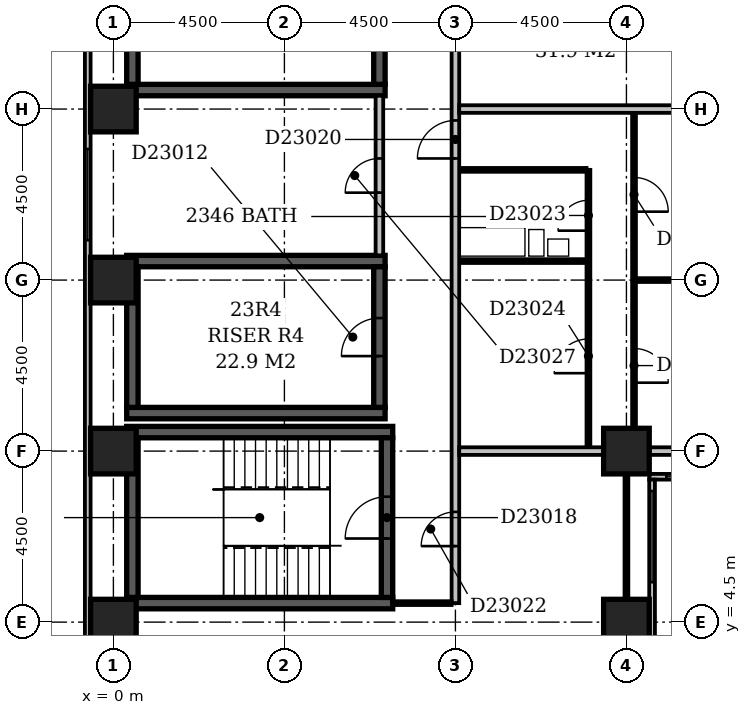
"""IFC4 building model, lengths in metres.
Left out: names, types, materials, properties, quantities, classifications, styles, units other than length and angle.
Written with IfcOpenShell. Run it as: python <this file> out.ifc"""

import sys

from ifc_helpers import new_model, si_unit, direction, frame, frame_2d, origin, origin_2d, place, context, subcontext, project, spatial, rectangle, extrude, element, fill, save


model = new_model("IFC4")
c1 = context("Model", 3, precision=1e-05, world=origin(), true_north=direction((0.0, 1.0)))
c2 = subcontext(c1, "Body", "Model", "MODEL_VIEW")
j1 = project(units=[si_unit("LENGTHUNIT", "METRE"), si_unit("PLANEANGLEUNIT", "RADIAN")], contexts=[c1])
p1 = place(None, origin())
s1 = spatial("IfcSite", under=j1, at=p1, CompositionType="ELEMENT")
p2 = place(p1, origin())
s2 = spatial("IfcBuilding", under=s1, at=p2, CompositionType="ELEMENT")
p3 = place(p2, frame((0.0, 0.0, 93.8)))
s3 = spatial("IfcBuildingStorey", under=s2, at=p3, CompositionType="ELEMENT", Elevation=93.8)
for number, where, z_axis, x_axis in (
    (1, (0.35, 5.0, -0.3), (0.0, 0.0, 1.0), (1.0, 0.0, 0.0)),
    (2, (0.35, 9.5, -0.3), (0.0, 0.0, 1.0), (1.0, 0.0, 0.0)),
):
    element("IfcWall", number, at=place(p3, frame(where, z_axis=z_axis, x_axis=x_axis)), inside=s3, PredefinedType="SHEAR", context=c2, shape_type="SweptSolid", body=[
        extrude(rectangle(XDim=7.0, YDim=0.3, at=frame_2d((3.5, 0.0))), origin(), (0.0, 0.0, 1.0), 3.6),
    ])
for number, where, z_axis, x_axis in (
    (3, (0.35, 10.0, -0.3), (0.0, 0.0, 1.0), (1.0, 0.0, 0.0)),
    (4, (0.35, 14.0, -0.3), (0.0, 0.0, 1.0), (1.0, 0.0, 0.0)),
    (5, (0.35, 18.5, -0.3), (0.0, 0.0, 1.0), (1.0, 0.0, 0.0)),
):
    element("IfcWall", number, at=place(p3, frame(where, z_axis=z_axis, x_axis=x_axis)), inside=s3, PredefinedType="SHEAR", context=c2, shape_type="SweptSolid", body=[
        extrude(rectangle(XDim=6.8, YDim=0.3, at=frame_2d((3.4, 0.0))), origin(), (0.0, 0.0, 1.0), 3.6),
    ])
p4 = place(p3, frame((0.5, 5.15, -0.3), z_axis=(0.0, 0.0, 1.0), x_axis=(0.0, 1.0, 0.0)))
e6 = element("IfcWall", 6, at=p4, inside=s3, PredefinedType="SHEAR", context=c2, shape_type="SweptSolid", body=[
    extrude(rectangle(XDim=4.2, YDim=0.3, at=frame_2d((2.1, 0.0))), origin(), (0.0, 0.0, 1.0), 3.6),
])
for number, where, z_axis, x_axis in (
    (7, (0.5, 10.15, -0.3), (0.0, 0.0, 1.0), (0.0, 1.0, 0.0)),
    (8, (0.5, 18.65, -0.3), (0.0, 0.0, 1.0), (0.0, 1.0, 0.0)),
):
    element("IfcWall", number, at=place(p3, frame(where, z_axis=z_axis, x_axis=x_axis)), inside=s3, PredefinedType="SHEAR", context=c2, shape_type="SweptSolid", body=[
        extrude(rectangle(XDim=3.7, YDim=0.3, at=frame_2d((1.85, 0.0))), origin(), (0.0, 0.0, 1.0), 3.6),
    ])
p5 = place(p3, frame((7.0, 10.15, -0.3), z_axis=(0.0, 0.0, 1.0), x_axis=(0.0, 1.0, 0.0)))
e9 = element("IfcWall", 9, at=p5, inside=s3, PredefinedType="SHEAR", context=c2, shape_type="SweptSolid", body=[
    extrude(rectangle(XDim=3.7, YDim=0.3, at=frame_2d((1.85, 0.0))), origin(), (0.0, 0.0, 1.0), 3.6),
])
p6 = place(p5, frame((1.35, 0.0, 0.3)))
e10 = element("IfcOpeningElement", 10, at=p6, cuts=e9, PredefinedType="OPENING", context=c2, shape_type="SweptSolid", body=[
    extrude(rectangle(XDim=1.0, YDim=2.1, at=frame_2d((0.5, 1.05))), frame((0.0, 0.162, 0.0), z_axis=(0.0, -1.0, 0.0), x_axis=(1.0, 0.0, 0.0)), (0.0, 0.0, 1.0), 0.324),
])
p7 = place(p3, frame((7.0, 18.65, -0.3), z_axis=(0.0, 0.0, 1.0), x_axis=(0.0, 1.0, 0.0)))
e11 = element("IfcWall", 11, at=p7, inside=s3, PredefinedType="SHEAR", context=c2, shape_type="SweptSolid", body=[
    extrude(rectangle(XDim=3.7, YDim=0.3, at=frame_2d((1.85, 0.0))), origin(), (0.0, 0.0, 1.0), 3.6),
])
p8 = place(p7, frame((1.35, 0.0, 0.3)))
e12 = element("IfcOpeningElement", 12, at=p8, cuts=e11, PredefinedType="OPENING", context=c2, shape_type="SweptSolid", body=[
    extrude(rectangle(XDim=1.0, YDim=2.1, at=frame_2d((0.5, 1.05))), frame((0.0, 0.162, 0.0), z_axis=(0.0, -1.0, 0.0), x_axis=(1.0, 0.0, 0.0)), (0.0, 0.0, 1.0), 0.324),
])
p9 = place(p3, frame((7.2, 5.15, -0.3), z_axis=(0.0, 0.0, 1.0), x_axis=(0.0, 1.0, 0.0)))
e13 = element("IfcWall", 13, at=p9, inside=s3, PredefinedType="SHEAR", context=c2, shape_type="SweptSolid", body=[
    extrude(rectangle(XDim=4.2, YDim=0.3, at=frame_2d((2.1, 0.0))), origin(), (0.0, 0.0, 1.0), 3.6),
])
p10 = place(p9, frame((1.55, 0.0, 0.3)))
e14 = element("IfcOpeningElement", 14, at=p10, cuts=e13, PredefinedType="OPENING", context=c2, shape_type="SweptSolid", body=[
    extrude(rectangle(XDim=1.1, YDim=2.1, at=frame_2d((0.55, 1.05))), frame((0.0, 0.162, 0.0), z_axis=(0.0, -1.0, 0.0), x_axis=(1.0, 0.0, 0.0)), (0.0, 0.0, 1.0), 0.324),
])
for number, where, z_axis, x_axis in (
    (15, (0.0, 4.5, -0.3), (0.0, 0.0, 1.0), (1.0, 0.0, 0.0)),
    (16, (13.5, 4.5, -0.3), (0.0, 0.0, 1.0), (1.0, 0.0, 0.0)),
    (17, (0.0, 9.0, -0.3), (0.0, 0.0, 1.0), (1.0, 0.0, 0.0)),
    (18, (13.5, 9.0, -0.3), (0.0, 0.0, 1.0), (1.0, 0.0, 0.0)),
    (19, (0.0, 13.5, -0.3), (0.0, 0.0, 1.0), (1.0, 0.0, 0.0)),
    (20, (0.0, 18.0, -0.3), (0.0, 0.0, 1.0), (1.0, 0.0, 0.0)),
):
    element("IfcColumn", number, at=place(p3, frame(where, z_axis=z_axis, x_axis=x_axis)), inside=s3, PredefinedType="COLUMN", context=c2, shape_type="SweptSolid", body=[
        extrude(rectangle(XDim=1.2, YDim=1.2, at=origin_2d()), origin(), (0.0, 0.0, 1.0), 3.6),
    ])
p11 = place(p3, frame((14.175, 3.9, 0.0), z_axis=(0.0, 0.0, 1.0), x_axis=(0.0, 1.0, 0.0)))
e21 = element("IfcWall", 21, at=p11, inside=s3, PredefinedType="STANDARD", context=c2, shape_type="SweptSolid", body=[
    extrude(rectangle(XDim=4.35, YDim=0.15, at=frame_2d((2.175, 0.0))), origin(), (0.0, 0.0, 1.0), 2.7),
])
p12 = place(p11, frame((1.65, 0.0, 0.6)))
e22 = element("IfcOpeningElement", 22, at=p12, cuts=e21, PredefinedType="OPENING", context=c2, shape_type="SweptSolid", body=[
    extrude(rectangle(XDim=2.4, YDim=1.8, at=frame_2d((1.2, 0.9))), frame((0.0, 0.087, 0.0), z_axis=(0.0, -1.0, 0.0), x_axis=(1.0, 0.0, 0.0)), (0.0, 0.0, 1.0), 0.174),
])
p13 = place(p3, frame((14.1, 8.325, 0.0), z_axis=(0.0, 0.0, 1.0), x_axis=(1.0, 0.0, 0.0)))
e23 = element("IfcWall", 23, at=p13, inside=s3, PredefinedType="STANDARD", context=c2, shape_type="SweptSolid", body=[
    extrude(rectangle(XDim=4.65, YDim=0.15, at=frame_2d((2.325, 0.0))), origin(), (0.0, 0.0, 1.0), 2.7),
])
p14 = place(p13, frame((0.45, 0.0, 0.6)))
e24 = element("IfcOpeningElement", 24, at=p14, cuts=e23, PredefinedType="OPENING", context=c2, shape_type="SweptSolid", body=[
    extrude(rectangle(XDim=2.4, YDim=1.8, at=frame_2d((1.2, 0.9))), frame((0.0, 0.087, 0.0), z_axis=(0.0, -1.0, 0.0), x_axis=(1.0, 0.0, 0.0)), (0.0, 0.0, 1.0), 0.174),
])
p15 = place(p3, frame((-0.675, 59.1, 0.0), z_axis=(0.0, 0.0, 1.0), x_axis=(0.0, -1.0, 0.0)))
e25 = element("IfcWall", 25, at=p15, inside=s3, PredefinedType="STANDARD", context=c2, shape_type="SweptSolid", body=[
    extrude(rectangle(XDim=55.35, YDim=0.15, at=frame_2d((27.675, 0.0))), origin(), (0.0, 0.0, 1.0), 2.7),
])
p16 = place(p15, frame((10.65, 0.0, 0.6)))
e26 = element("IfcOpeningElement", 26, at=p16, cuts=e25, PredefinedType="OPENING", context=c2, shape_type="SweptSolid", body=[
    extrude(rectangle(XDim=2.4, YDim=1.8, at=frame_2d((1.2, 0.9))), frame((0.0, 0.087, 0.0), z_axis=(0.0, -1.0, 0.0), x_axis=(1.0, 0.0, 0.0)), (0.0, 0.0, 1.0), 0.174),
])
p17 = place(p15, frame((15.15, 0.0, 0.6)))
e27 = element("IfcOpeningElement", 27, at=p17, cuts=e25, PredefinedType="OPENING", context=c2, shape_type="SweptSolid", body=[
    extrude(rectangle(XDim=2.4, YDim=1.8, at=frame_2d((1.2, 0.9))), frame((0.0, 0.087, 0.0), z_axis=(0.0, -1.0, 0.0), x_axis=(1.0, 0.0, 0.0)), (0.0, 0.0, 1.0), 0.174),
])
p18 = place(p15, frame((19.65, 0.0, 0.6)))
e28 = element("IfcOpeningElement", 28, at=p18, cuts=e25, PredefinedType="OPENING", context=c2, shape_type="SweptSolid", body=[
    extrude(rectangle(XDim=2.4, YDim=1.8, at=frame_2d((1.2, 0.9))), frame((0.0, 0.087, 0.0), z_axis=(0.0, -1.0, 0.0), x_axis=(1.0, 0.0, 0.0)), (0.0, 0.0, 1.0), 0.174),
])
p19 = place(p15, frame((42.15, 0.0, 0.6)))
e29 = element("IfcOpeningElement", 29, at=p19, cuts=e25, PredefinedType="OPENING", context=c2, shape_type="SweptSolid", body=[
    extrude(rectangle(XDim=2.4, YDim=1.8, at=frame_2d((1.2, 0.9))), frame((0.0, 0.087, 0.0), z_axis=(0.0, -1.0, 0.0), x_axis=(1.0, 0.0, 0.0)), (0.0, 0.0, 1.0), 0.174),
])
p20 = place(p3, frame((0.0, 4.4, 0.0), z_axis=(0.0, 0.0, 1.0), x_axis=(0.0, 1.0, 0.0)))
e30 = element("IfcWall", 30, at=p20, inside=s3, PredefinedType="PARTITIONING", context=c2, shape_type="SweptSolid", body=[
    extrude(rectangle(XDim=0.7, YDim=0.1, at=frame_2d((0.35, 0.0))), origin(), (0.0, 0.0, 1.0), 2.7),
])
p21 = place(p3, frame((7.349, 5.0, 0.0), z_axis=(0.0, 0.0, 1.0), x_axis=(1.0, 0.0, 0.0)))
e31 = element("IfcWall", 31, at=p21, inside=s3, PredefinedType="PARTITIONING", context=c2, shape_type="SweptSolid", body=[
    extrude(rectangle(XDim=1.551, YDim=0.1, at=frame_2d((0.775, 0.0))), origin(), (0.0, 0.0, 1.0), 3.3),
])
p22 = place(p3, frame((9.0, 5.0, 0.0), z_axis=(0.0, 0.0, 1.0), x_axis=(0.0, 1.0, 0.0)))
e32 = element("IfcWall", 32, at=p22, inside=s3, PredefinedType="PARTITIONING", context=c2, shape_type="SweptSolid", body=[
    extrude(rectangle(XDim=44.5, YDim=0.2, at=frame_2d((22.25, 0.0))), origin(), (0.0, 0.0, 1.0), 3.3),
])
p23 = place(p22, frame((18.4, 0.0, 0.0)))
e33 = element("IfcOpeningElement", 33, at=p23, cuts=e32, PredefinedType="OPENING", context=c2, shape_type="SweptSolid", body=[
    extrude(rectangle(XDim=1.0, YDim=2.1, at=frame_2d((0.5, 1.05))), frame((0.0, 0.112, 0.0), z_axis=(0.0, -1.0, 0.0), x_axis=(1.0, 0.0, 0.0)), (0.0, 0.0, 1.0), 0.224),
])
p24 = place(p22, frame((11.7, 0.0, 0.0)))
e34 = element("IfcOpeningElement", 34, at=p24, cuts=e32, PredefinedType="OPENING", context=c2, shape_type="SweptSolid", body=[
    extrude(rectangle(XDim=1.0, YDim=2.1, at=frame_2d((0.5, 1.05))), frame((0.0, 0.112, 0.0), z_axis=(0.0, -1.0, 0.0), x_axis=(1.0, 0.0, 0.0)), (0.0, 0.0, 1.0), 0.224),
])
p25 = place(p22, frame((37.25, 0.0, 0.0)))
e35 = element("IfcOpeningElement", 35, at=p25, cuts=e32, PredefinedType="OPENING", context=c2, shape_type="SweptSolid", body=[
    extrude(rectangle(XDim=0.9, YDim=2.1, at=frame_2d((0.45, 1.05))), frame((0.0, 0.112, 0.0), z_axis=(0.0, -1.0, 0.0), x_axis=(1.0, 0.0, 0.0)), (0.0, 0.0, 1.0), 0.224),
])
p26 = place(p22, frame((1.5, 0.0, 0.0)))
e36 = element("IfcOpeningElement", 36, at=p26, cuts=e32, PredefinedType="OPENING", context=c2, shape_type="SweptSolid", body=[
    extrude(rectangle(XDim=0.9, YDim=2.1, at=frame_2d((0.45, 1.05))), frame((0.0, 0.112, 0.0), z_axis=(0.0, -1.0, 0.0), x_axis=(1.0, 0.0, 0.0)), (0.0, 0.0, 1.0), 0.224),
])
p27 = place(p3, frame((13.5, 5.1, 0.0), z_axis=(0.0, 0.0, 1.0), x_axis=(0.0, 1.0, 0.0)))
e37 = element("IfcWall", 37, at=p27, inside=s3, PredefinedType="PARTITIONING", context=c2, shape_type="SweptSolid", body=[
    extrude(rectangle(XDim=3.3, YDim=0.1, at=frame_2d((1.65, 0.0))), origin(), (0.0, 0.0, 1.0), 2.7),
])
p28 = place(p3, frame((9.1, 9.0, 0.0), z_axis=(0.0, 0.0, 1.0), x_axis=(1.0, 0.0, 0.0)))
e38 = element("IfcWall", 38, at=p28, inside=s3, PredefinedType="PARTITIONING", context=c2, shape_type="SweptSolid", body=[
    extrude(rectangle(XDim=3.8, YDim=0.2, at=frame_2d((1.9, 0.0))), origin(), (0.0, 0.0, 1.0), 3.3),
])
p29 = place(p3, frame((14.1, 9.0, 0.0), z_axis=(0.0, 0.0, 1.0), x_axis=(1.0, 0.0, 0.0)))
e39 = element("IfcWall", 39, at=p29, inside=s3, PredefinedType="PARTITIONING", context=c2, shape_type="SweptSolid", body=[
    extrude(rectangle(XDim=3.3, YDim=0.2, at=frame_2d((1.65, 0.0))), origin(), (0.0, 0.0, 1.0), 2.7),
])
p30 = place(p3, frame((12.5, 9.1, 0.0), z_axis=(0.0, 0.0, 1.0), x_axis=(0.0, 1.0, 0.0)))
e40 = element("IfcWall", 40, at=p30, inside=s3, PredefinedType="PARTITIONING", context=c2, shape_type="SweptSolid", body=[
    extrude(rectangle(XDim=7.3, YDim=0.1, at=frame_2d((3.65, 0.0))), origin(), (0.0, 0.0, 1.0), 3.3),
])
p31 = place(p30, frame((5.7, 0.0, 0.0)))
e41 = element("IfcOpeningElement", 41, at=p31, cuts=e40, PredefinedType="OPENING", context=c2, shape_type="SweptSolid", body=[
    extrude(rectangle(XDim=0.8, YDim=2.1, at=frame_2d((0.4, 1.05))), frame((0.0, 0.062, 0.0), z_axis=(0.0, -1.0, 0.0), x_axis=(1.0, 0.0, 0.0)), (0.0, 0.0, 1.0), 0.124),
])
p32 = place(p30, frame((1.95, 0.0, 0.0)))
e42 = element("IfcOpeningElement", 42, at=p32, cuts=e40, PredefinedType="OPENING", context=c2, shape_type="SweptSolid", body=[
    extrude(rectangle(XDim=0.9, YDim=2.1, at=frame_2d((0.45, 1.05))), frame((0.0, 0.062, 0.0), z_axis=(0.0, -1.0, 0.0), x_axis=(1.0, 0.0, 0.0)), (0.0, 0.0, 1.0), 0.124),
])
p33 = place(p3, frame((13.7, 9.6, 0.0), z_axis=(0.0, 0.0, 1.0), x_axis=(0.0, 1.0, 0.0)))
e43 = element("IfcWall", 43, at=p33, inside=s3, PredefinedType="PARTITIONING", context=c2, shape_type="SweptSolid", body=[
    extrude(rectangle(XDim=8.3, YDim=0.1, at=frame_2d((4.15, 0.0))), origin(), (0.0, 0.0, 1.0), 3.3),
])
p34 = place(p33, frame((1.2, 0.0, 0.0)))
e44 = element("IfcOpeningElement", 44, at=p34, cuts=e43, PredefinedType="OPENING", context=c2, shape_type="SweptSolid", body=[
    extrude(rectangle(XDim=0.9, YDim=2.1, at=frame_2d((0.45, 1.05))), frame((0.0, 0.062, 0.0), z_axis=(0.0, -1.0, 0.0), x_axis=(1.0, 0.0, 0.0)), (0.0, 0.0, 1.0), 0.124),
])
p35 = place(p33, frame((5.7, 0.0, 0.0)))
e45 = element("IfcOpeningElement", 45, at=p35, cuts=e43, PredefinedType="OPENING", context=c2, shape_type="SweptSolid", body=[
    extrude(rectangle(XDim=0.9, YDim=2.1, at=frame_2d((0.45, 1.05))), frame((0.0, 0.062, 0.0), z_axis=(0.0, -1.0, 0.0), x_axis=(1.0, 0.0, 0.0)), (0.0, 0.0, 1.0), 0.124),
])
p36 = place(p3, frame((13.75, 13.5, 0.0), z_axis=(0.0, 0.0, 1.0), x_axis=(1.0, 0.0, 0.0)))
e46 = element("IfcWall", 46, at=p36, inside=s3, PredefinedType="PARTITIONING", context=c2, shape_type="SweptSolid", body=[
    extrude(rectangle(XDim=3.65, YDim=0.1, at=frame_2d((1.825, 0.0))), origin(), (0.0, 0.0, 1.0), 3.3),
])
p37 = place(p3, frame((9.1, 14.0, 0.0), z_axis=(0.0, 0.0, 1.0), x_axis=(1.0, 0.0, 0.0)))
e47 = element("IfcWall", 47, at=p37, inside=s3, PredefinedType="PLUMBINGWALL", context=c2, shape_type="SweptSolid", body=[
    extrude(rectangle(XDim=3.35, YDim=0.1, at=frame_2d((1.675, 0.0))), origin(), (0.0, 0.0, 1.0), 3.3),
])
p38 = place(p3, frame((7.0, 14.15, 0.0), z_axis=(0.0, 0.0, 1.0), x_axis=(0.0, 1.0, 0.0)))
e48 = element("IfcWall", 48, at=p38, inside=s3, PredefinedType="PARTITIONING", context=c2, shape_type="SweptSolid", body=[
    extrude(rectangle(XDim=4.2, YDim=0.2, at=frame_2d((2.1, 0.0))), origin(), (0.0, 0.0, 1.0), 3.3),
])
p39 = place(p38, frame((1.65, 0.0, 0.0)))
e49 = element("IfcOpeningElement", 49, at=p39, cuts=e48, PredefinedType="OPENING", context=c2, shape_type="SweptSolid", body=[
    extrude(rectangle(XDim=0.9, YDim=2.1, at=frame_2d((0.45, 1.05))), frame((0.0, 0.112, 0.0), z_axis=(0.0, -1.0, 0.0), x_axis=(1.0, 0.0, 0.0)), (0.0, 0.0, 1.0), 0.224),
])
p40 = place(p3, frame((9.1, 16.4, 0.0), z_axis=(0.0, 0.0, 1.0), x_axis=(1.0, 0.0, 0.0)))
e50 = element("IfcWall", 50, at=p40, inside=s3, PredefinedType="PLUMBINGWALL", context=c2, shape_type="SweptSolid", body=[
    extrude(rectangle(XDim=3.35, YDim=0.1, at=frame_2d((1.675, 0.0))), origin(), (0.0, 0.0, 1.0), 3.3),
])
p41 = place(p3, frame((9.1, 18.0, 0.0), z_axis=(0.0, 0.0, 1.0), x_axis=(1.0, 0.0, 0.0)))
e51 = element("IfcWall", 51, at=p41, inside=s3, PredefinedType="PARTITIONING", context=c2, shape_type="SweptSolid", body=[
    extrude(rectangle(XDim=8.3, YDim=0.2, at=frame_2d((4.15, 0.0))), origin(), (0.0, 0.0, 1.0), 2.6),
])
p42 = place(p12, origin())
e52 = element("IfcWindow", 52, at=p42, inside=s3, PartitioningType="SINGLE_PANEL", PredefinedType="WINDOW", context=c2, shape_type="SweptSolid", body=[
    extrude(rectangle(XDim=2.4, YDim=1.8, at=frame_2d((1.2, 0.9))), frame((0.0, 0.03, 0.0), z_axis=(0.0, -1.0, 0.0), x_axis=(1.0, 0.0, 0.0)), (0.0, 0.0, 1.0), 0.06),
])
fill(e22, e52)
p43 = place(p14, origin())
e53 = element("IfcWindow", 53, at=p43, inside=s3, PartitioningType="SINGLE_PANEL", PredefinedType="WINDOW", context=c2, shape_type="SweptSolid", body=[
    extrude(rectangle(XDim=2.4, YDim=1.8, at=frame_2d((1.2, 0.9))), frame((0.0, 0.03, 0.0), z_axis=(0.0, -1.0, 0.0), x_axis=(1.0, 0.0, 0.0)), (0.0, 0.0, 1.0), 0.06),
])
fill(e24, e53)
p44 = place(p19, origin())
e54 = element("IfcWindow", 54, at=p44, inside=s3, PartitioningType="SINGLE_PANEL", PredefinedType="WINDOW", context=c2, shape_type="SweptSolid", body=[
    extrude(rectangle(XDim=2.4, YDim=1.8, at=frame_2d((1.2, 0.9))), frame((0.0, 0.03, 0.0), z_axis=(0.0, -1.0, 0.0), x_axis=(1.0, 0.0, 0.0)), (0.0, 0.0, 1.0), 0.06),
])
fill(e29, e54)
p45 = place(p6, origin())
e55 = element("IfcDoor", 55, at=p45, inside=s3, OperationType="SINGLE_SWING_LEFT", PredefinedType="DOOR", context=c2, shape_type="SweptSolid", body=[
    extrude(rectangle(XDim=1.0, YDim=2.1, at=frame_2d((0.5, 1.05))), frame((0.0, 0.025, 0.0), z_axis=(0.0, -1.0, 0.0), x_axis=(1.0, 0.0, 0.0)), (0.0, 0.0, 1.0), 0.05),
])
fill(e10, e55)
p46 = place(p10, origin())
e56 = element("IfcDoor", 56, at=p46, inside=s3, OperationType="SINGLE_SWING_LEFT", PredefinedType="DOOR", context=c2, shape_type="SweptSolid", body=[
    extrude(rectangle(XDim=1.1, YDim=2.1, at=frame_2d((0.55, 1.05))), frame((0.0, 0.025, 0.0), z_axis=(0.0, -1.0, 0.0), x_axis=(1.0, 0.0, 0.0)), (0.0, 0.0, 1.0), 0.05),
])
fill(e14, e56)
p47 = place(p24, origin())
e57 = element("IfcDoor", 57, at=p47, inside=s3, OperationType="SINGLE_SWING_LEFT", PredefinedType="DOOR", context=c2, shape_type="SweptSolid", body=[
    extrude(rectangle(XDim=1.0, YDim=2.1, at=frame_2d((0.5, 1.05))), frame((0.0, 0.025, 0.0), z_axis=(0.0, -1.0, 0.0), x_axis=(1.0, 0.0, 0.0)), (0.0, 0.0, 1.0), 0.05),
])
fill(e34, e57)
p48 = place(p26, origin())
e58 = element("IfcDoor", 58, at=p48, inside=s3, OperationType="SINGLE_SWING_LEFT", PredefinedType="DOOR", context=c2, shape_type="SweptSolid", body=[
    extrude(rectangle(XDim=0.9, YDim=2.1, at=frame_2d((0.45, 1.05))), frame((0.0, 0.025, 0.0), z_axis=(0.0, -1.0, 0.0), x_axis=(1.0, 0.0, 0.0)), (0.0, 0.0, 1.0), 0.05),
])
fill(e36, e58)
p49 = place(p31, origin())
e59 = element("IfcDoor", 59, at=p49, inside=s3, OperationType="SINGLE_SWING_LEFT", PredefinedType="DOOR", context=c2, shape_type="SweptSolid", body=[
    extrude(rectangle(XDim=0.8, YDim=2.1, at=frame_2d((0.4, 1.05))), frame((0.0, 0.025, 0.0), z_axis=(0.0, -1.0, 0.0), x_axis=(1.0, 0.0, 0.0)), (0.0, 0.0, 1.0), 0.05),
])
fill(e41, e59)
p50 = place(p32, origin())
e60 = element("IfcDoor", 60, at=p50, inside=s3, OperationType="SINGLE_SWING_LEFT", PredefinedType="DOOR", context=c2, shape_type="SweptSolid", body=[
    extrude(rectangle(XDim=0.9, YDim=2.1, at=frame_2d((0.45, 1.05))), frame((0.0, 0.025, 0.0), z_axis=(0.0, -1.0, 0.0), x_axis=(1.0, 0.0, 0.0)), (0.0, 0.0, 1.0), 0.05),
])
fill(e42, e60)
p51 = place(p34, frame((0.9, 0.0, 0.0), z_axis=(0.0, 0.0, 1.0), x_axis=(-1.0, 0.0, 0.0)))
e61 = element("IfcDoor", 61, at=p51, inside=s3, OperationType="SINGLE_SWING_RIGHT", PredefinedType="DOOR", context=c2, shape_type="SweptSolid", body=[
    extrude(rectangle(XDim=0.9, YDim=2.1, at=frame_2d((0.45, 1.05))), frame((0.0, 0.025, 0.0), z_axis=(0.0, -1.0, 0.0), x_axis=(1.0, 0.0, 0.0)), (0.0, 0.0, 1.0), 0.05),
])
fill(e44, e61)
p52 = place(p35, frame((0.9, 0.0, 0.0), z_axis=(0.0, 0.0, 1.0), x_axis=(-1.0, 0.0, 0.0)))
e62 = element("IfcDoor", 62, at=p52, inside=s3, OperationType="SINGLE_SWING_RIGHT", PredefinedType="DOOR", context=c2, shape_type="SweptSolid", body=[
    extrude(rectangle(XDim=0.9, YDim=2.1, at=frame_2d((0.45, 1.05))), frame((0.0, 0.025, 0.0), z_axis=(0.0, -1.0, 0.0), x_axis=(1.0, 0.0, 0.0)), (0.0, 0.0, 1.0), 0.05),
])
fill(e45, e62)
p53 = place(p39, origin())
e63 = element("IfcDoor", 63, at=p53, inside=s3, OperationType="SINGLE_SWING_LEFT", PredefinedType="DOOR", context=c2, shape_type="SweptSolid", body=[
    extrude(rectangle(XDim=0.9, YDim=2.1, at=frame_2d((0.45, 1.05))), frame((0.0, 0.025, 0.0), z_axis=(0.0, -1.0, 0.0), x_axis=(1.0, 0.0, 0.0)), (0.0, 0.0, 1.0), 0.05),
])
fill(e49, e63)
save(model, sys.argv[1])
